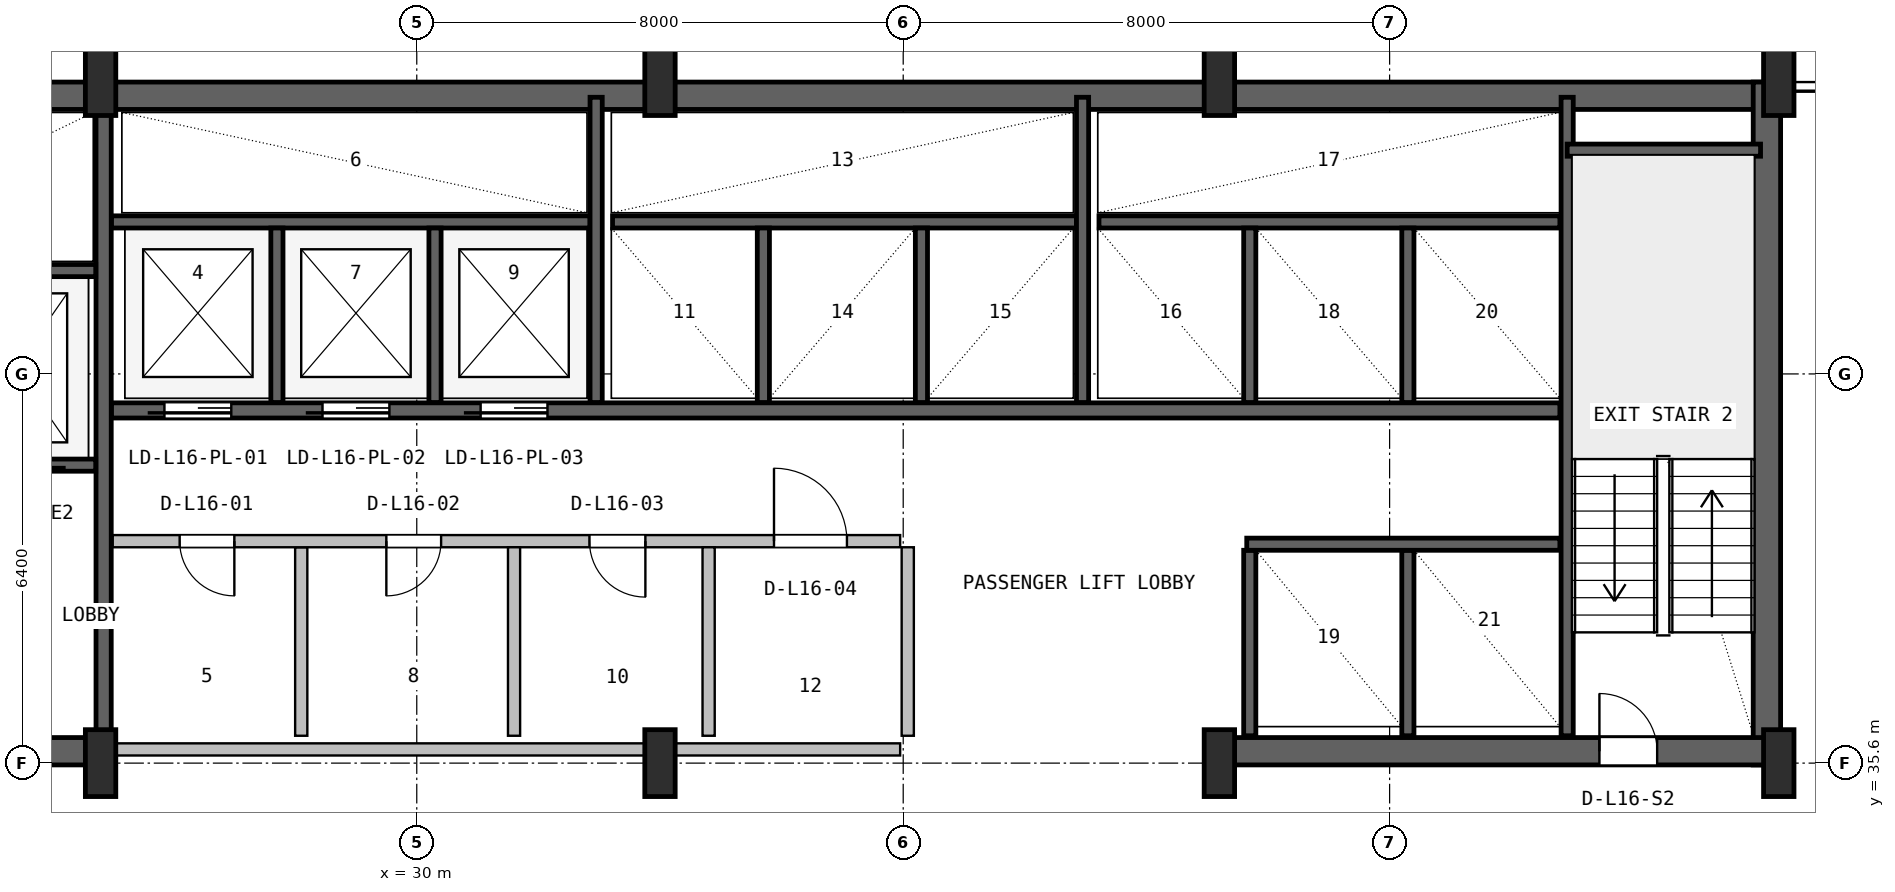
"""IFC4 building model, lengths in metres.
Left out: names, types, materials, properties, quantities, classifications, styles, units other than length and angle.
Written with IfcOpenShell. Run it as: python <this file> out.ifc"""

import sys

from ifc_helpers import new_model, si_unit, direction, frame, frame_2d, origin, origin_2d, place, context, subcontext, project, spatial, rectangle, i_section, extrude, source, transform, mapped, element, fill, save


model = new_model("IFC4")
c1 = context("Model", 3, precision=1e-05, world=origin(), true_north=direction((0.0, 1.0)))
c2 = subcontext(c1, "Body", "Model", "MODEL_VIEW")
j1 = project(units=[si_unit("LENGTHUNIT", "METRE"), si_unit("PLANEANGLEUNIT", "RADIAN")], contexts=[c1])
p1 = place(None, origin())
s1 = spatial("IfcSite", under=j1, at=p1, CompositionType="ELEMENT")
p2 = place(p1, origin())
s2 = spatial("IfcBuilding", under=s1, at=p2, CompositionType="ELEMENT")
p3 = place(p2, frame((0.0, 0.0, 70.5)))
s3 = spatial("IfcBuildingStorey", under=s2, at=p3, CompositionType="ELEMENT", Elevation=70.5)
p4 = place(p3, frame((15.6, 46.575, 0.0), z_axis=(0.0, 0.0, 1.0), x_axis=(1.0, 0.0, 0.0)))
e1 = element("IfcWall", 1, at=p4, inside=s3, PredefinedType="SHEAR", context=c2, shape_type="SweptSolid", body=[
    extrude(rectangle(XDim=36.8, YDim=0.45, at=frame_2d((18.4, 0.0))), origin(), (0.0, 0.0, 1.0), 3.65),
])
p5 = place(p3, frame((52.205, 35.57, 0.0), z_axis=(0.0, 0.0, 1.0), x_axis=(0.0, 1.0, 0.0)))
e2 = element("IfcWall", 2, at=p5, inside=s3, PredefinedType="SHEAR", context=c2, shape_type="SweptSolid", body=[
    extrude(rectangle(XDim=11.23, YDim=0.45, at=frame_2d((5.615, 0.0))), origin(), (0.0, 0.0, 1.0), 3.65),
])
p6 = place(p3, frame((15.57, 35.795, 0.0), z_axis=(0.0, 0.0, 1.0), x_axis=(1.0, 0.0, 0.0)))
e3 = element("IfcWall", 3, at=p6, inside=s3, PredefinedType="SHEAR", context=c2, shape_type="SweptSolid", body=[
    extrude(rectangle(XDim=9.23, YDim=0.45, at=frame_2d((4.615, 0.0))), origin(), (0.0, 0.0, 1.0), 3.65),
])
p7 = place(p6, frame((5.4, 0.0, 0.0)))
e4 = element("IfcOpeningElement", 4, at=p7, cuts=e3, PredefinedType="OPENING", context=c2, shape_type="SweptSolid", body=[
    extrude(rectangle(XDim=1.0, YDim=2.1, at=frame_2d((0.5, 1.05))), frame((0.0, 0.235, 0.0), z_axis=(0.0, -1.0, 0.0), x_axis=(1.0, 0.0, 0.0)), (0.0, 0.0, 1.0), 0.47),
])
p8 = place(p3, frame((43.2, 35.795, 0.0), z_axis=(0.0, 0.0, 1.0), x_axis=(1.0, 0.0, 0.0)))
e5 = element("IfcWall", 5, at=p8, inside=s3, PredefinedType="SHEAR", context=c2, shape_type="SweptSolid", body=[
    extrude(rectangle(XDim=9.23, YDim=0.45, at=frame_2d((4.615, 0.0))), origin(), (0.0, 0.0, 1.0), 3.65),
])
p9 = place(p8, frame((6.25, 0.0, 0.0)))
e6 = element("IfcOpeningElement", 6, at=p9, cuts=e5, PredefinedType="OPENING", context=c2, shape_type="SweptSolid", body=[
    extrude(rectangle(XDim=0.95, YDim=2.1, at=frame_2d((0.475, 1.05))), frame((0.0, 0.235, 0.0), z_axis=(0.0, -1.0, 0.0), x_axis=(1.0, 0.0, 0.0)), (0.0, 0.0, 1.0), 0.47),
])
m1 = source(origin(), c2, "Body", "SweptSolid", [
    extrude(i_section(OverallWidth=0.5, OverallDepth=1.1, WebThickness=0.018, FlangeThickness=0.032, FilletRadius=0.018, at=origin_2d()), origin(), (0.0, 0.0, 1.0), 3.9),
])
for number, where, z_axis, x_axis in (
    (7, (24.8, 35.6, 0.0), (0.0, 0.0, 1.0), (1.0, 0.0, 0.0)),
    (8, (24.8, 46.8, 0.0), (0.0, 0.0, 1.0), (1.0, 0.0, 0.0)),
    (9, (34.0, 35.6, 0.0), (0.0, 0.0, 1.0), (1.0, 0.0, 0.0)),
    (10, (34.0, 46.8, 0.0), (0.0, 0.0, 1.0), (1.0, 0.0, 0.0)),
    (11, (43.2, 35.6, 0.0), (0.0, 0.0, 1.0), (1.0, 0.0, 0.0)),
    (12, (43.2, 46.8, 0.0), (0.0, 0.0, 1.0), (1.0, 0.0, 0.0)),
    (13, (52.4, 35.6, 0.0), (0.0, 0.0, 1.0), (1.0, 0.0, 0.0)),
    (14, (52.4, 46.8, 0.0), (0.0, 0.0, 1.0), (1.0, 0.0, 0.0)),
):
    element("IfcColumn", number, at=place(p3, frame(where, z_axis=z_axis, x_axis=x_axis)), inside=s3, PredefinedType="COLUMN", context=c2, shape_type="MappedRepresentation", body=[
        mapped(m1, transform((0.0, 0.0, 0.0), x_axis=(1.0, 0.0, 0.0), y_axis=(0.0, 1.0, 0.0), z_axis=(0.0, 0.0, 1.0), scale=1.0)),
    ])
p10 = place(p3, frame((24.85, 36.05, 0.0), z_axis=(0.0, 0.0, 1.0), x_axis=(0.0, 1.0, 0.0)))
e15 = element("IfcWall", 15, at=p10, inside=s3, PredefinedType="SHEAR", context=c2, shape_type="SweptSolid", body=[
    extrude(rectangle(XDim=10.45, YDim=0.25, at=frame_2d((5.225, 0.0))), origin(), (0.0, 0.0, 1.0), 3.65),
])
p11 = place(p3, frame((19.2, 40.5, 0.0), z_axis=(0.0, 0.0, 1.0), x_axis=(1.0, 0.0, 0.0)))
e16 = element("IfcWall", 16, at=p11, inside=s3, PredefinedType="SHEAR", context=c2, shape_type="SweptSolid", body=[
    extrude(rectangle(XDim=5.52, YDim=0.2, at=frame_2d((2.76, 0.0))), origin(), (0.0, 0.0, 1.0), 3.65),
])
p12 = place(p11, frame((1.05, 0.0, 0.0)))
e17 = element("IfcOpeningElement", 17, at=p12, cuts=e16, PredefinedType="OPENING", context=c2, shape_type="SweptSolid", body=[
    extrude(rectangle(XDim=1.1, YDim=2.18, at=frame_2d((0.55, 1.09))), frame((0.0, 0.11, 0.0), z_axis=(0.0, -1.0, 0.0), x_axis=(1.0, 0.0, 0.0)), (0.0, 0.0, 1.0), 0.22),
])
p13 = place(p11, frame((3.65, 0.0, 0.0)))
e18 = element("IfcOpeningElement", 18, at=p13, cuts=e16, PredefinedType="OPENING", context=c2, shape_type="SweptSolid", body=[
    extrude(rectangle(XDim=1.1, YDim=2.18, at=frame_2d((0.55, 1.09))), frame((0.0, 0.11, 0.0), z_axis=(0.0, -1.0, 0.0), x_axis=(1.0, 0.0, 0.0)), (0.0, 0.0, 1.0), 0.22),
])
p14 = place(p3, frame((19.2, 43.7, 0.0), z_axis=(0.0, 0.0, 1.0), x_axis=(1.0, 0.0, 0.0)))
e19 = element("IfcWall", 19, at=p14, inside=s3, PredefinedType="SHEAR", context=c2, shape_type="SweptSolid", body=[
    extrude(rectangle(XDim=5.52, YDim=0.2, at=frame_2d((2.76, 0.0))), origin(), (0.0, 0.0, 1.0), 3.65),
])
p15 = place(p3, frame((48.92, 36.05, 0.0), z_axis=(0.0, 0.0, 1.0), x_axis=(0.0, 1.0, 0.0)))
e20 = element("IfcWall", 20, at=p15, inside=s3, PredefinedType="SHEAR", context=c2, shape_type="SweptSolid", body=[
    extrude(rectangle(XDim=10.5, YDim=0.2, at=frame_2d((5.25, 0.0))), origin(), (0.0, 0.0, 1.0), 3.65),
])
p16 = place(p3, frame((48.92, 45.68, 0.0), z_axis=(0.0, 0.0, 1.0), x_axis=(1.0, 0.0, 0.0)))
e21 = element("IfcWall", 21, at=p16, inside=s3, PredefinedType="SHEAR", context=c2, shape_type="SweptSolid", body=[
    extrude(rectangle(XDim=3.18, YDim=0.2, at=frame_2d((1.59, 0.0))), origin(), (0.0, 0.0, 1.0), 3.65),
])
p17 = place(p3, frame((24.98, 41.4, 0.0), z_axis=(0.0, 0.0, 1.0), x_axis=(1.0, 0.0, 0.0)))
e22 = element("IfcWall", 22, at=p17, inside=s3, PredefinedType="SHEAR", context=c2, shape_type="SweptSolid", body=[
    extrude(rectangle(XDim=23.82, YDim=0.25, at=frame_2d((11.91, 0.0))), origin(), (0.0, 0.0, 1.0), 3.65),
])
p18 = place(p17, frame((0.87, 0.0, 0.0)))
e23 = element("IfcOpeningElement", 23, at=p18, cuts=e22, PredefinedType="OPENING", context=c2, shape_type="SweptSolid", body=[
    extrude(rectangle(XDim=1.1, YDim=2.18, at=frame_2d((0.55, 1.09))), frame((0.0, 0.135, 0.0), z_axis=(0.0, -1.0, 0.0), x_axis=(1.0, 0.0, 0.0)), (0.0, 0.0, 1.0), 0.27),
])
p19 = place(p17, frame((3.47, 0.0, 0.0)))
e24 = element("IfcOpeningElement", 24, at=p19, cuts=e22, PredefinedType="OPENING", context=c2, shape_type="SweptSolid", body=[
    extrude(rectangle(XDim=1.1, YDim=2.18, at=frame_2d((0.55, 1.09))), frame((0.0, 0.135, 0.0), z_axis=(0.0, -1.0, 0.0), x_axis=(1.0, 0.0, 0.0)), (0.0, 0.0, 1.0), 0.27),
])
p20 = place(p17, frame((6.07, 0.0, 0.0)))
e25 = element("IfcOpeningElement", 25, at=p20, cuts=e22, PredefinedType="OPENING", context=c2, shape_type="SweptSolid", body=[
    extrude(rectangle(XDim=1.1, YDim=2.18, at=frame_2d((0.55, 1.09))), frame((0.0, 0.135, 0.0), z_axis=(0.0, -1.0, 0.0), x_axis=(1.0, 0.0, 0.0)), (0.0, 0.0, 1.0), 0.27),
])
p21 = place(p3, frame((24.98, 44.5, 0.0), z_axis=(0.0, 0.0, 1.0), x_axis=(1.0, 0.0, 0.0)))
e26 = element("IfcWall", 26, at=p21, inside=s3, PredefinedType="SHEAR", context=c2, shape_type="SweptSolid", body=[
    extrude(rectangle(XDim=7.87, YDim=0.2, at=frame_2d((3.935, 0.0))), origin(), (0.0, 0.0, 1.0), 3.65),
])
for number, where, z_axis, x_axis in (
    (27, (27.7, 41.53, 0.0), (0.0, 0.0, 1.0), (0.0, 1.0, 0.0)),
    (28, (30.3, 41.53, 0.0), (0.0, 0.0, 1.0), (0.0, 1.0, 0.0)),
):
    element("IfcWall", number, at=place(p3, frame(where, z_axis=z_axis, x_axis=x_axis)), inside=s3, PredefinedType="SHEAR", context=c2, shape_type="SweptSolid", body=[
        extrude(rectangle(XDim=2.87, YDim=0.2, at=frame_2d((1.435, 0.0))), origin(), (0.0, 0.0, 1.0), 3.65),
    ])
p22 = place(p3, frame((32.95, 41.53, 0.0), z_axis=(0.0, 0.0, 1.0), x_axis=(0.0, 1.0, 0.0)))
e29 = element("IfcWall", 29, at=p22, inside=s3, PredefinedType="SHEAR", context=c2, shape_type="SweptSolid", body=[
    extrude(rectangle(XDim=5.02, YDim=0.2, at=frame_2d((2.51, 0.0))), origin(), (0.0, 0.0, 1.0), 3.65),
])
p23 = place(p3, frame((33.22, 44.5, 0.0), z_axis=(0.0, 0.0, 1.0), x_axis=(1.0, 0.0, 0.0)))
e30 = element("IfcWall", 30, at=p23, inside=s3, PredefinedType="SHEAR", context=c2, shape_type="SweptSolid", body=[
    extrude(rectangle(XDim=7.63, YDim=0.2, at=frame_2d((3.815, 0.0))), origin(), (0.0, 0.0, 1.0), 3.65),
])
for number, where, z_axis, x_axis in (
    (31, (35.7, 41.53, 0.0), (0.0, 0.0, 1.0), (0.0, 1.0, 0.0)),
    (32, (38.3, 41.53, 0.0), (0.0, 0.0, 1.0), (0.0, 1.0, 0.0)),
):
    element("IfcWall", number, at=place(p3, frame(where, z_axis=z_axis, x_axis=x_axis)), inside=s3, PredefinedType="SHEAR", context=c2, shape_type="SweptSolid", body=[
        extrude(rectangle(XDim=2.87, YDim=0.2, at=frame_2d((1.435, 0.0))), origin(), (0.0, 0.0, 1.0), 3.65),
    ])
p24 = place(p3, frame((40.95, 41.53, 0.0), z_axis=(0.0, 0.0, 1.0), x_axis=(0.0, 1.0, 0.0)))
e33 = element("IfcWall", 33, at=p24, inside=s3, PredefinedType="SHEAR", context=c2, shape_type="SweptSolid", body=[
    extrude(rectangle(XDim=5.02, YDim=0.2, at=frame_2d((2.51, 0.0))), origin(), (0.0, 0.0, 1.0), 3.65),
])
p25 = place(p3, frame((41.22, 44.5, 0.0), z_axis=(0.0, 0.0, 1.0), x_axis=(1.0, 0.0, 0.0)))
e34 = element("IfcWall", 34, at=p25, inside=s3, PredefinedType="SHEAR", context=c2, shape_type="SweptSolid", body=[
    extrude(rectangle(XDim=7.58, YDim=0.2, at=frame_2d((3.79, 0.0))), origin(), (0.0, 0.0, 1.0), 3.65),
])
for number, where, z_axis, x_axis in (
    (35, (43.7, 41.53, 0.0), (0.0, 0.0, 1.0), (0.0, 1.0, 0.0)),
    (36, (46.3, 41.53, 0.0), (0.0, 0.0, 1.0), (0.0, 1.0, 0.0)),
):
    element("IfcWall", number, at=place(p3, frame(where, z_axis=z_axis, x_axis=x_axis)), inside=s3, PredefinedType="SHEAR", context=c2, shape_type="SweptSolid", body=[
        extrude(rectangle(XDim=2.87, YDim=0.2, at=frame_2d((1.435, 0.0))), origin(), (0.0, 0.0, 1.0), 3.65),
    ])
for number, where, z_axis, x_axis in (
    (37, (43.7, 36.05, 0.0), (0.0, 0.0, 1.0), (0.0, 1.0, 0.0)),
    (38, (46.3, 36.05, 0.0), (0.0, 0.0, 1.0), (0.0, 1.0, 0.0)),
):
    element("IfcWall", number, at=place(p3, frame(where, z_axis=z_axis, x_axis=x_axis)), inside=s3, PredefinedType="SHEAR", context=c2, shape_type="SweptSolid", body=[
        extrude(rectangle(XDim=3.05, YDim=0.2, at=frame_2d((1.525, 0.0))), origin(), (0.0, 0.0, 1.0), 3.65),
    ])
p26 = place(p3, frame((43.65, 39.2, 0.0), z_axis=(0.0, 0.0, 1.0), x_axis=(1.0, 0.0, 0.0)))
e39 = element("IfcWall", 39, at=p26, inside=s3, PredefinedType="SHEAR", context=c2, shape_type="SweptSolid", body=[
    extrude(rectangle(XDim=5.15, YDim=0.2, at=frame_2d((2.575, 0.0))), origin(), (0.0, 0.0, 1.0), 3.65),
])
p27 = place(p3, frame((25.0, 35.825, 0.0), z_axis=(0.0, 0.0, 1.0), x_axis=(1.0, 0.0, 0.0)))
e40 = element("IfcWall", 40, at=p27, inside=s3, PredefinedType="SOLIDWALL", context=c2, shape_type="SweptSolid", body=[
    extrude(rectangle(XDim=12.95, YDim=0.2, at=frame_2d((6.475, 0.0))), origin(), (0.0, 0.0, 1.0), 2.425),
])
p28 = place(p3, frame((28.1, 36.05, 0.0), z_axis=(0.0, 0.0, 1.0), x_axis=(0.0, 1.0, 0.0)))
e41 = element("IfcWall", 41, at=p28, inside=s3, PredefinedType="PLUMBINGWALL", context=c2, shape_type="SweptSolid", body=[
    extrude(rectangle(XDim=3.1, YDim=0.2, at=frame_2d((1.55, 0.0))), origin(), (0.0, 0.0, 1.0), 3.63),
])
p29 = place(p3, frame((25.0, 39.25, 0.0), z_axis=(0.0, 0.0, 1.0), x_axis=(1.0, 0.0, 0.0)))
e42 = element("IfcWall", 42, at=p29, inside=s3, PredefinedType="SOLIDWALL", context=c2, shape_type="SweptSolid", body=[
    extrude(rectangle(XDim=12.95, YDim=0.2, at=frame_2d((6.475, 0.0))), origin(), (0.0, 0.0, 1.0), 3.63),
])
p30 = place(p29, frame((1.1, 0.0, 0.0)))
e43 = element("IfcOpeningElement", 43, at=p30, cuts=e42, PredefinedType="OPENING", context=c2, shape_type="SweptSolid", body=[
    extrude(rectangle(XDim=0.9, YDim=2.06, at=frame_2d((0.45, 1.03))), frame((0.0, 0.11, 0.0), z_axis=(0.0, -1.0, 0.0), x_axis=(1.0, 0.0, 0.0)), (0.0, 0.0, 1.0), 0.22),
])
p31 = place(p29, frame((4.5, 0.0, 0.0)))
e44 = element("IfcOpeningElement", 44, at=p31, cuts=e42, PredefinedType="OPENING", context=c2, shape_type="SweptSolid", body=[
    extrude(rectangle(XDim=0.9, YDim=2.06, at=frame_2d((0.45, 1.03))), frame((0.0, 0.11, 0.0), z_axis=(0.0, -1.0, 0.0), x_axis=(1.0, 0.0, 0.0)), (0.0, 0.0, 1.0), 0.22),
])
p32 = place(p29, frame((7.84, 0.0, 0.0)))
e45 = element("IfcOpeningElement", 45, at=p32, cuts=e42, PredefinedType="OPENING", context=c2, shape_type="SweptSolid", body=[
    extrude(rectangle(XDim=0.92, YDim=2.08, at=frame_2d((0.46, 1.04))), frame((0.0, 0.11, 0.0), z_axis=(0.0, -1.0, 0.0), x_axis=(1.0, 0.0, 0.0)), (0.0, 0.0, 1.0), 0.22),
])
p33 = place(p29, frame((10.875, 0.0, 0.0)))
e46 = element("IfcOpeningElement", 46, at=p33, cuts=e42, PredefinedType="OPENING", context=c2, shape_type="SweptSolid", body=[
    extrude(rectangle(XDim=1.2, YDim=2.1, at=frame_2d((0.6, 1.05))), frame((0.0, 0.11, 0.0), z_axis=(0.0, -1.0, 0.0), x_axis=(1.0, 0.0, 0.0)), (0.0, 0.0, 1.0), 0.22),
])
p34 = place(p3, frame((31.6, 36.05, 0.0), z_axis=(0.0, 0.0, 1.0), x_axis=(0.0, 1.0, 0.0)))
e47 = element("IfcWall", 47, at=p34, inside=s3, PredefinedType="PLUMBINGWALL", context=c2, shape_type="SweptSolid", body=[
    extrude(rectangle(XDim=3.1, YDim=0.2, at=frame_2d((1.55, 0.0))), origin(), (0.0, 0.0, 1.0), 3.63),
])
for number, where, z_axis, x_axis in (
    (48, (34.8, 36.05, 0.0), (0.0, 0.0, 1.0), (0.0, 1.0, 0.0)),
    (49, (38.075, 36.05, 0.0), (0.0, 0.0, 1.0), (0.0, 1.0, 0.0)),
):
    element("IfcWall", number, at=place(p3, frame(where, z_axis=z_axis, x_axis=x_axis)), inside=s3, PredefinedType="SOLIDWALL", context=c2, shape_type="SweptSolid", body=[
        extrude(rectangle(XDim=3.1, YDim=0.2, at=frame_2d((1.55, 0.0))), origin(), (0.0, 0.0, 1.0), 3.63),
    ])
m2 = source(origin(), c2, "Body", "SweptSolid", [
    extrude(rectangle(XDim=0.95, YDim=2.1, at=frame_2d((0.475, 1.05))), frame((0.0, 0.025, 0.0), z_axis=(0.0, -1.0, 0.0), x_axis=(1.0, 0.0, 0.0)), (0.0, 0.0, 1.0), 0.05),
])
p35 = place(p9, origin())
e50 = element("IfcDoor", 50, at=p35, inside=s3, OperationType="SINGLE_SWING_LEFT", PredefinedType="DOOR", context=c2, shape_type="MappedRepresentation", body=[
    mapped(m2, transform((0.0, 0.0, 0.0), x_axis=(1.0, 0.0, 0.0), y_axis=(0.0, 1.0, 0.0), z_axis=(0.0, 0.0, 1.0), scale=1.0)),
])
fill(e6, e50)
m3 = source(origin(), c2, "Body", "SweptSolid", [
    extrude(rectangle(XDim=1.1, YDim=2.18, at=frame_2d((0.55, 1.09))), frame((0.0, 0.025, 0.0), z_axis=(0.0, -1.0, 0.0), x_axis=(1.0, 0.0, 0.0)), (0.0, 0.0, 1.0), 0.05),
])
p36 = place(p18, frame((1.1, 0.0, 0.0), z_axis=(0.0, 0.0, 1.0), x_axis=(-1.0, 0.0, 0.0)))
e51 = element("IfcDoor", 51, at=p36, inside=s3, OperationType="SLIDING_TO_LEFT", PredefinedType="DOOR", context=c2, shape_type="MappedRepresentation", body=[
    mapped(m3, transform((0.0, 0.0, 0.0), x_axis=(1.0, 0.0, 0.0), y_axis=(0.0, 1.0, 0.0), z_axis=(0.0, 0.0, 1.0), scale=1.0)),
])
fill(e23, e51)
p37 = place(p19, frame((1.1, 0.0, 0.0), z_axis=(0.0, 0.0, 1.0), x_axis=(-1.0, 0.0, 0.0)))
e52 = element("IfcDoor", 52, at=p37, inside=s3, OperationType="SLIDING_TO_LEFT", PredefinedType="DOOR", context=c2, shape_type="MappedRepresentation", body=[
    mapped(m3, transform((0.0, 0.0, 0.0), x_axis=(1.0, 0.0, 0.0), y_axis=(0.0, 1.0, 0.0), z_axis=(0.0, 0.0, 1.0), scale=1.0)),
])
fill(e24, e52)
p38 = place(p20, frame((1.1, 0.0, 0.0), z_axis=(0.0, 0.0, 1.0), x_axis=(-1.0, 0.0, 0.0)))
e53 = element("IfcDoor", 53, at=p38, inside=s3, OperationType="SLIDING_TO_LEFT", PredefinedType="DOOR", context=c2, shape_type="MappedRepresentation", body=[
    mapped(m3, transform((0.0, 0.0, 0.0), x_axis=(1.0, 0.0, 0.0), y_axis=(0.0, 1.0, 0.0), z_axis=(0.0, 0.0, 1.0), scale=1.0)),
])
fill(e25, e53)
m4 = source(origin(), c2, "Body", "SweptSolid", [
    extrude(rectangle(XDim=0.9, YDim=2.06, at=frame_2d((0.45, 1.03))), frame((0.0, 0.025, 0.0), z_axis=(0.0, -1.0, 0.0), x_axis=(1.0, 0.0, 0.0)), (0.0, 0.0, 1.0), 0.05),
])
p39 = place(p30, frame((0.9, 0.0, 0.0), z_axis=(0.0, 0.0, 1.0), x_axis=(-1.0, 0.0, 0.0)))
e54 = element("IfcDoor", 54, at=p39, inside=s3, OperationType="SINGLE_SWING_RIGHT", PredefinedType="DOOR", context=c2, shape_type="MappedRepresentation", body=[
    mapped(m4, transform((0.0, 0.0, 0.0), x_axis=(1.0, 0.0, 0.0), y_axis=(0.0, 1.0, 0.0), z_axis=(0.0, 0.0, 1.0), scale=1.0)),
])
fill(e43, e54)
p40 = place(p31, frame((0.9, 0.0, 0.0), z_axis=(0.0, 0.0, 1.0), x_axis=(-1.0, 0.0, 0.0)))
e55 = element("IfcDoor", 55, at=p40, inside=s3, OperationType="SINGLE_SWING_LEFT", PredefinedType="DOOR", context=c2, shape_type="MappedRepresentation", body=[
    mapped(m4, transform((0.0, 0.0, 0.0), x_axis=(1.0, 0.0, 0.0), y_axis=(0.0, 1.0, 0.0), z_axis=(0.0, 0.0, 1.0), scale=1.0)),
])
fill(e44, e55)
m5 = source(origin(), c2, "Body", "SweptSolid", [
    extrude(rectangle(XDim=0.92, YDim=2.08, at=frame_2d((0.46, 1.04))), frame((0.0, 0.025, 0.0), z_axis=(0.0, -1.0, 0.0), x_axis=(1.0, 0.0, 0.0)), (0.0, 0.0, 1.0), 0.05),
])
p41 = place(p32, frame((0.92, 0.0, 0.0), z_axis=(0.0, 0.0, 1.0), x_axis=(-1.0, 0.0, 0.0)))
e56 = element("IfcDoor", 56, at=p41, inside=s3, OperationType="SINGLE_SWING_RIGHT", PredefinedType="DOOR", context=c2, shape_type="MappedRepresentation", body=[
    mapped(m5, transform((0.0, 0.0, 0.0), x_axis=(1.0, 0.0, 0.0), y_axis=(0.0, 1.0, 0.0), z_axis=(0.0, 0.0, 1.0), scale=1.0)),
])
fill(e45, e56)
m6 = source(origin(), c2, "Body", "SweptSolid", [
    extrude(rectangle(XDim=1.2, YDim=2.1, at=frame_2d((0.6, 1.05))), frame((0.0, 0.025, 0.0), z_axis=(0.0, -1.0, 0.0), x_axis=(1.0, 0.0, 0.0)), (0.0, 0.0, 1.0), 0.05),
])
p42 = place(p33, origin())
e57 = element("IfcDoor", 57, at=p42, inside=s3, OperationType="SINGLE_SWING_LEFT", PredefinedType="DOOR", context=c2, shape_type="MappedRepresentation", body=[
    mapped(m6, transform((0.0, 0.0, 0.0), x_axis=(1.0, 0.0, 0.0), y_axis=(0.0, 1.0, 0.0), z_axis=(0.0, 0.0, 1.0), scale=1.0)),
])
fill(e46, e57)
save(model, sys.argv[1])
